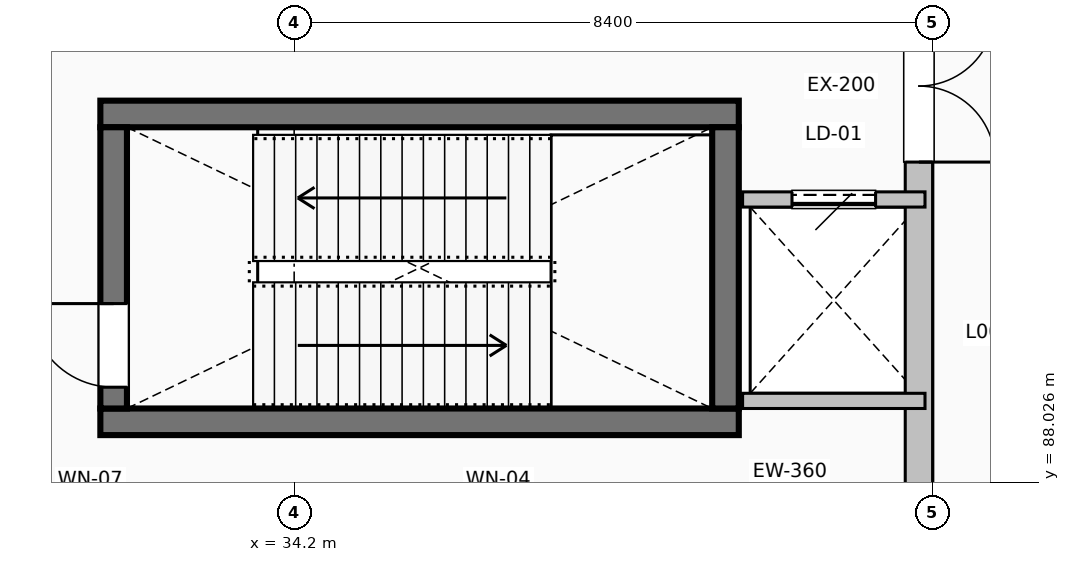
"""IFC4 building model, lengths in metres.
Left out: names, types, materials, properties, quantities, classifications, styles, units other than length and angle.
Written with IfcOpenShell. Run it as: python <this file> out.ifc"""

import sys

from ifc_helpers import new_model, si_unit, direction, frame, frame_2d, origin, place, context, subcontext, project, spatial, rectangle, extrude, element, fill, save


model = new_model("IFC4")
c1 = context("Model", 3, precision=1e-05, world=origin(), true_north=direction((0.0, 1.0)))
c2 = subcontext(c1, "Body", "Model", "MODEL_VIEW")
j1 = project(units=[si_unit("LENGTHUNIT", "METRE"), si_unit("PLANEANGLEUNIT", "RADIAN")], contexts=[c1])
p1 = place(None, origin())
s1 = spatial("IfcSite", under=j1, at=p1, CompositionType="ELEMENT")
p2 = place(p1, origin())
s2 = spatial("IfcBuilding", under=s1, at=p2, CompositionType="ELEMENT")
p3 = place(p2, origin())
s3 = spatial("IfcBuildingStorey", under=s2, at=p3, CompositionType="ELEMENT", Elevation=0.0)
for number, where, z_axis, x_axis in (
    (1, (31.65, 88.825, 0.0), (0.0, 0.0, 1.0), (1.0, 0.0, 0.0)),
    (2, (40.05, 92.875, 0.0), (0.0, 0.0, 1.0), (-1.0, 0.0, 0.0)),
):
    element("IfcWall", number, at=place(p3, frame(where, z_axis=z_axis, x_axis=x_axis)), inside=s3, PredefinedType="SHEAR", context=c2, shape_type="SweptSolid", body=[
        extrude(rectangle(XDim=8.4, YDim=0.35, at=frame_2d((4.2, 0.0))), origin(), (0.0, 0.0, 1.0), 5.1),
    ])
p4 = place(p3, frame((31.825, 89.0, 0.0), z_axis=(0.0, 0.0, 1.0), x_axis=(0.0, 1.0, 0.0)))
e3 = element("IfcWall", 3, at=p4, inside=s3, PredefinedType="SHEAR", context=c2, shape_type="SweptSolid", body=[
    extrude(rectangle(XDim=3.7, YDim=0.35, at=frame_2d((1.85, 0.0))), origin(), (0.0, 0.0, 1.0), 5.1),
])
p5 = place(p4, frame((0.28, 0.0, 0.0)))
e4 = element("IfcOpeningElement", 4, at=p5, cuts=e3, PredefinedType="OPENING", context=c2, shape_type="SweptSolid", body=[
    extrude(rectangle(XDim=1.1, YDim=2.08, at=frame_2d((0.55, 1.04))), frame((0.0, 0.185, 0.0), z_axis=(0.0, -1.0, 0.0), x_axis=(1.0, 0.0, 0.0)), (0.0, 0.0, 1.0), 0.37),
])
p6 = place(p3, frame((39.875, 92.7, 0.0), z_axis=(0.0, 0.0, 1.0), x_axis=(0.0, -1.0, 0.0)))
e5 = element("IfcWall", 5, at=p6, inside=s3, PredefinedType="SHEAR", context=c2, shape_type="SweptSolid", body=[
    extrude(rectangle(XDim=3.7, YDim=0.35, at=frame_2d((1.85, 0.0))), origin(), (0.0, 0.0, 1.0), 5.1),
])
p7 = place(p3, frame((42.42, 96.275, 0.0), z_axis=(0.0, 0.0, 1.0), x_axis=(0.0, -1.0, 0.0)))
e6 = element("IfcWall", 6, at=p7, inside=s3, PredefinedType="SOLIDWALL", context=c2, shape_type="SweptSolid", body=[
    extrude(rectangle(XDim=8.665, YDim=0.36, at=frame_2d((4.333, 0.0))), origin(), (0.0, 0.0, 1.0), 4.192),
])
p8 = place(p7, frame((2.033, 0.0, 0.0)))
e7 = element("IfcOpeningElement", 7, at=p8, cuts=e6, PredefinedType="OPENING", context=c2, shape_type="SweptSolid", body=[
    extrude(rectangle(XDim=2.0, YDim=2.4, at=frame_2d((1.0, 1.2))), frame((0.0, 0.19, 0.0), z_axis=(0.0, -1.0, 0.0), x_axis=(1.0, 0.0, 0.0)), (0.0, 0.0, 1.0), 0.38),
])
p9 = place(p3, frame((40.1, 89.1, 0.0), z_axis=(0.0, 0.0, 1.0), x_axis=(1.0, 0.0, 0.0)))
e8 = element("IfcWall", 8, at=p9, inside=s3, PredefinedType="PARTITIONING", context=c2, shape_type="SweptSolid", body=[
    extrude(rectangle(XDim=2.4, YDim=0.2, at=frame_2d((1.2, 0.0))), origin(), (0.0, 0.0, 1.0), 5.092),
])
p10 = place(p3, frame((42.5, 91.75, 0.0), z_axis=(0.0, 0.0, 1.0), x_axis=(-1.0, 0.0, 0.0)))
e9 = element("IfcWall", 9, at=p10, inside=s3, PredefinedType="PARTITIONING", context=c2, shape_type="SweptSolid", body=[
    extrude(rectangle(XDim=2.4, YDim=0.2, at=frame_2d((1.2, 0.0))), origin(), (0.0, 0.0, 1.0), 5.092),
])
p11 = place(p10, frame((0.65, 0.0, 0.0)))
e10 = element("IfcOpeningElement", 10, at=p11, cuts=e9, PredefinedType="OPENING", context=c2, shape_type="SweptSolid", body=[
    extrude(rectangle(XDim=1.1, YDim=2.15, at=frame_2d((0.55, 1.075))), frame((0.0, 0.11, 0.0), z_axis=(0.0, -1.0, 0.0), x_axis=(1.0, 0.0, 0.0)), (0.0, 0.0, 1.0), 0.22),
])
p12 = place(p8, origin())
e11 = element("IfcDoor", 11, at=p12, inside=s3, OperationType="DOUBLE_DOOR_SINGLE_SWING", PredefinedType="DOOR", context=c2, shape_type="SweptSolid", body=[
    extrude(rectangle(XDim=2.0, YDim=2.4, at=frame_2d((1.0, 1.2))), frame((0.0, 0.025, 0.0), z_axis=(0.0, -1.0, 0.0), x_axis=(1.0, 0.0, 0.0)), (0.0, 0.0, 1.0), 0.05),
])
fill(e7, e11)
p13 = place(p5, origin())
e12 = element("IfcDoor", 12, at=p13, inside=s3, OperationType="SINGLE_SWING_RIGHT", PredefinedType="DOOR", context=c2, shape_type="SweptSolid", body=[
    extrude(rectangle(XDim=1.1, YDim=2.08, at=frame_2d((0.55, 1.04))), frame((0.0, 0.025, 0.0), z_axis=(0.0, -1.0, 0.0), x_axis=(1.0, 0.0, 0.0)), (0.0, 0.0, 1.0), 0.05),
])
fill(e4, e12)
p14 = place(p11, origin())
e13 = element("IfcDoor", 13, at=p14, inside=s3, OperationType="SLIDING_TO_LEFT", PredefinedType="DOOR", context=c2, shape_type="SweptSolid", body=[
    extrude(rectangle(XDim=1.1, YDim=2.15, at=frame_2d((0.55, 1.075))), frame((0.0, 0.025, 0.0), z_axis=(0.0, -1.0, 0.0), x_axis=(1.0, 0.0, 0.0)), (0.0, 0.0, 1.0), 0.05),
])
fill(e10, e13)
save(model, sys.argv[1])
